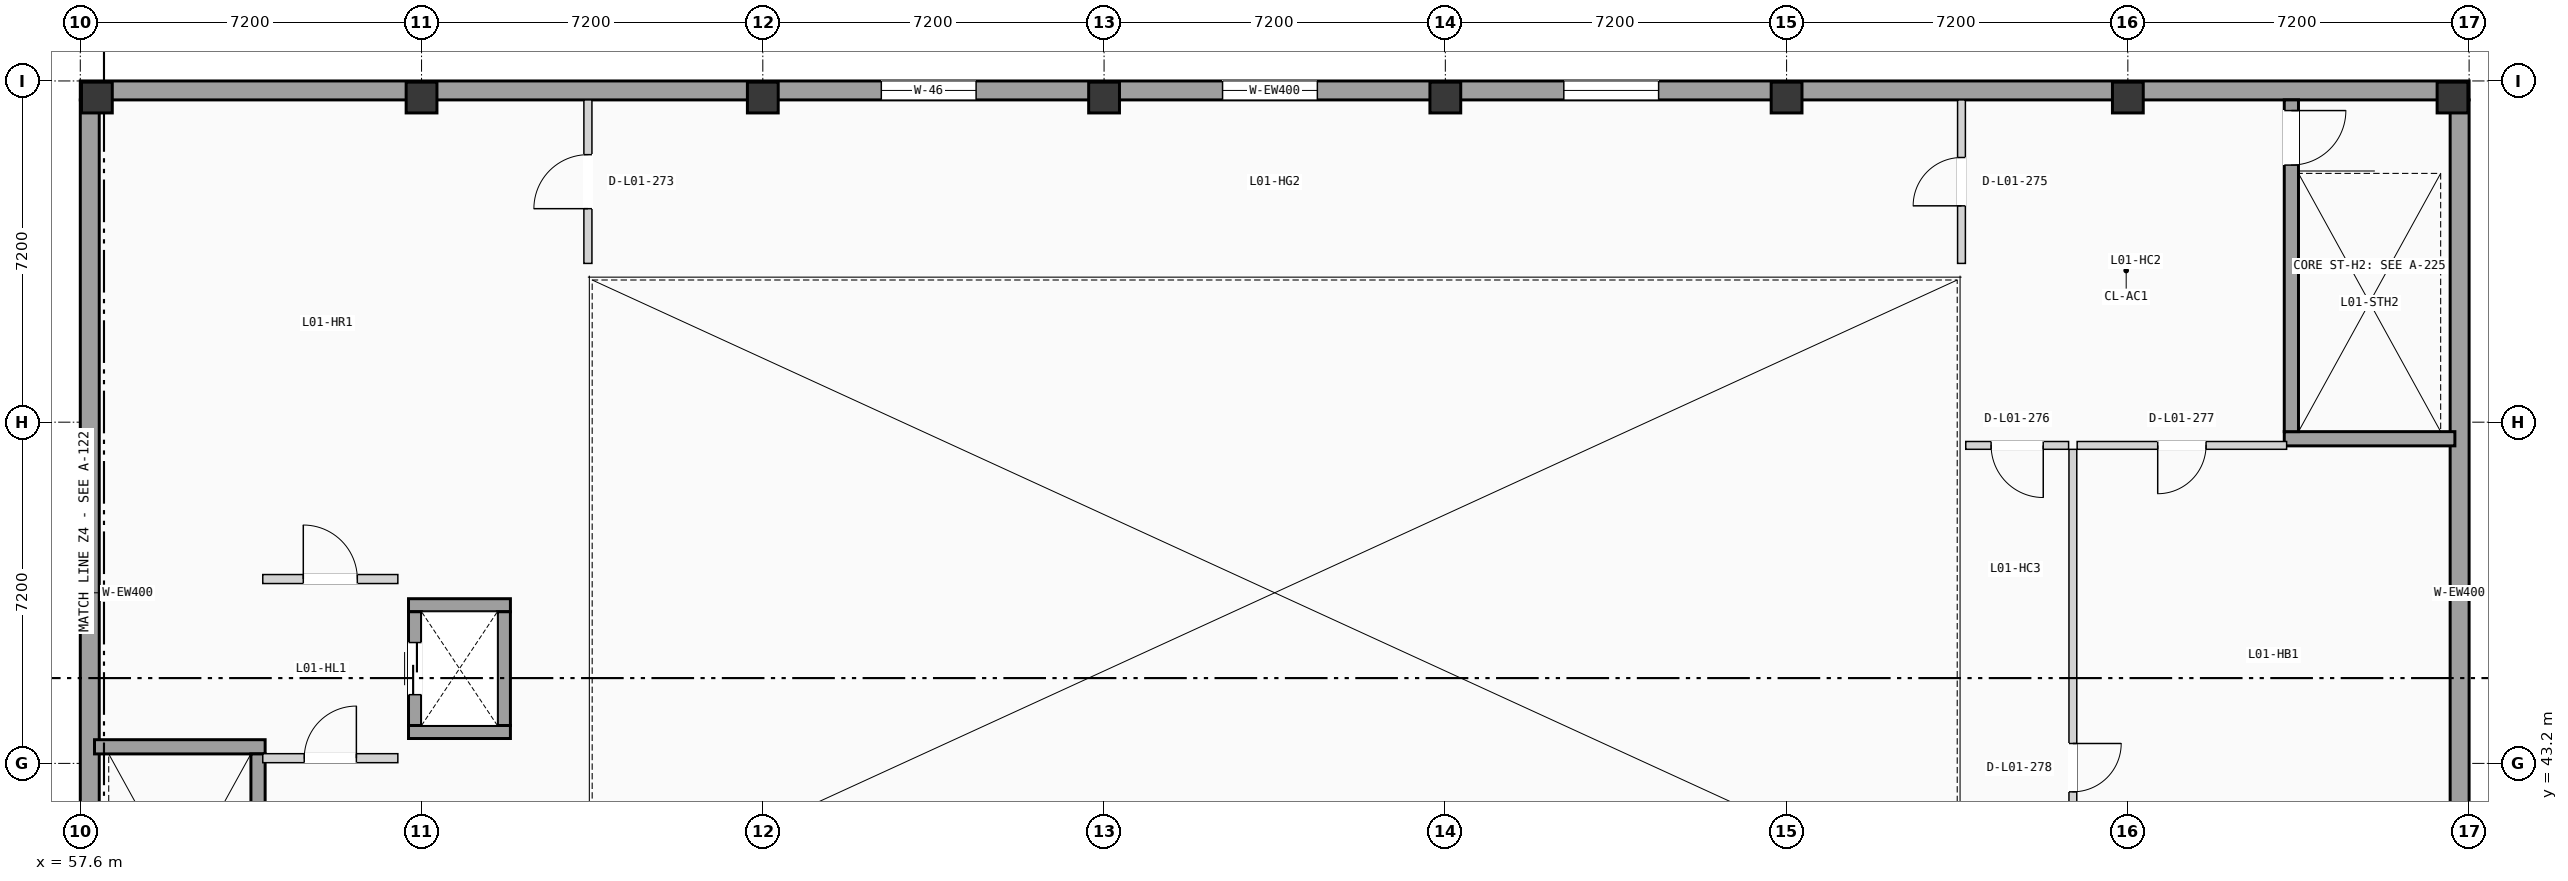
"""IFC4 building model, lengths in metres.
Left out: names, types, materials, properties, quantities, classifications, styles, units other than length and angle.
Written with IfcOpenShell. Run it as: python <this file> out.ifc"""

import sys

from ifc_helpers import new_model, si_unit, direction, frame, frame_2d, origin, origin_2d, place, context, subcontext, project, spatial, rectangle, extrude, element, fill, save


model = new_model("IFC4")
c1 = context("Model", 3, precision=1e-05, world=origin(), true_north=direction((0.0, 1.0)))
c2 = subcontext(c1, "Body", "Model", "MODEL_VIEW")
j1 = project(units=[si_unit("LENGTHUNIT", "METRE"), si_unit("PLANEANGLEUNIT", "RADIAN")], contexts=[c1])
p1 = place(None, origin())
s1 = spatial("IfcSite", under=j1, at=p1, CompositionType="ELEMENT")
p2 = place(p1, origin())
s2 = spatial("IfcBuilding", under=s1, at=p2, CompositionType="ELEMENT")
p3 = place(p2, frame((0.0, 0.0, 4.9)))
s3 = spatial("IfcBuildingStorey", under=s2, at=p3, CompositionType="ELEMENT", Elevation=4.9)
for number, where, z_axis, x_axis in (
    (1, (57.95, 57.25, 0.0), (0.0, 0.0, 1.0), (1.0, 0.0, 0.0)),
    (2, (64.8, 57.25, 0.0), (0.0, 0.0, 1.0), (1.0, 0.0, 0.0)),
    (3, (72.0, 57.25, 0.0), (0.0, 0.0, 1.0), (1.0, 0.0, 0.0)),
    (4, (79.2, 57.25, 0.0), (0.0, 0.0, 1.0), (1.0, 0.0, 0.0)),
    (5, (86.4, 57.25, 0.0), (0.0, 0.0, 1.0), (1.0, 0.0, 0.0)),
    (6, (93.6, 57.25, 0.0), (0.0, 0.0, 1.0), (1.0, 0.0, 0.0)),
    (7, (100.8, 57.25, 0.0), (0.0, 0.0, 1.0), (1.0, 0.0, 0.0)),
    (8, (107.65, 57.25, 0.0), (0.0, 0.0, 1.0), (1.0, 0.0, 0.0)),
):
    element("IfcColumn", number, at=place(p3, frame(where, z_axis=z_axis, x_axis=x_axis)), inside=s3, PredefinedType="COLUMN", context=c2, shape_type="SweptSolid", body=[
        extrude(rectangle(XDim=0.65, YDim=0.65, at=origin_2d()), origin(), (0.0, 0.0, 1.0), 3.675),
    ])
p4 = place(p3, frame((57.6, 57.4, 0.0), z_axis=(0.0, 0.0, 1.0), x_axis=(1.0, 0.0, 0.0)))
e9 = element("IfcWall", 9, at=p4, inside=s3, PredefinedType="SOLIDWALL", context=c2, shape_type="SweptSolid", body=[
    extrude(rectangle(XDim=50.4, YDim=0.4, at=frame_2d((25.2, 0.0))), origin(), (0.0, 0.0, 1.0), 3.675),
])
p5 = place(p4, frame((16.9, 0.0, 0.9)))
e10 = element("IfcOpeningElement", 10, at=p5, cuts=e9, PredefinedType="OPENING", context=c2, shape_type="SweptSolid", body=[
    extrude(rectangle(XDim=2.0, YDim=1.2, at=frame_2d((1.0, 0.6))), frame((0.0, 0.21, 0.0), z_axis=(0.0, -1.0, 0.0), x_axis=(1.0, 0.0, 0.0)), (0.0, 0.0, 1.0), 0.42),
])
p6 = place(p4, frame((24.1, 0.0, 0.9)))
e11 = element("IfcOpeningElement", 11, at=p6, cuts=e9, PredefinedType="OPENING", context=c2, shape_type="SweptSolid", body=[
    extrude(rectangle(XDim=2.0, YDim=1.2, at=frame_2d((1.0, 0.6))), frame((0.0, 0.21, 0.0), z_axis=(0.0, -1.0, 0.0), x_axis=(1.0, 0.0, 0.0)), (0.0, 0.0, 1.0), 0.42),
])
p7 = place(p4, frame((31.3, 0.0, 0.9)))
e12 = element("IfcOpeningElement", 12, at=p7, cuts=e9, PredefinedType="OPENING", context=c2, shape_type="SweptSolid", body=[
    extrude(rectangle(XDim=2.0, YDim=1.2, at=frame_2d((1.0, 0.6))), frame((0.0, 0.21, 0.0), z_axis=(0.0, -1.0, 0.0), x_axis=(1.0, 0.0, 0.0)), (0.0, 0.0, 1.0), 0.42),
])
for number, where, z_axis, x_axis in (
    (13, (57.8, 36.4, 0.0), (0.0, 0.0, 1.0), (0.0, 1.0, 0.0)),
    (14, (107.8, 36.4, 0.0), (0.0, 0.0, 1.0), (0.0, 1.0, 0.0)),
):
    element("IfcWall", number, at=place(p3, frame(where, z_axis=z_axis, x_axis=x_axis)), inside=s3, PredefinedType="SOLIDWALL", context=c2, shape_type="SweptSolid", body=[
        extrude(rectangle(XDim=20.8, YDim=0.4, at=frame_2d((10.4, 0.0))), origin(), (0.0, 0.0, 1.0), 3.675),
    ])
p8 = place(p3, frame((57.9, 43.55, 0.0), z_axis=(0.0, 0.0, 1.0), x_axis=(1.0, 0.0, 0.0)))
e15 = element("IfcWall", 15, at=p8, inside=s3, PredefinedType="SHEAR", context=c2, shape_type="SweptSolid", body=[
    extrude(rectangle(XDim=3.6, YDim=0.3, at=frame_2d((1.8, 0.0))), origin(), (0.0, 0.0, 1.0), 3.405),
])
p9 = place(p3, frame((61.35, 36.4, 0.0), z_axis=(0.0, 0.0, 1.0), x_axis=(0.0, 1.0, 0.0)))
e16 = element("IfcWall", 16, at=p9, inside=s3, PredefinedType="SHEAR", context=c2, shape_type="SweptSolid", body=[
    extrude(rectangle(XDim=7.0, YDim=0.3, at=frame_2d((3.5, 0.0))), origin(), (0.0, 0.0, 1.0), 3.405),
])
p10 = place(p9, frame((0.225, 0.0, 0.0)))
e17 = element("IfcOpeningElement", 17, at=p10, cuts=e16, PredefinedType="OPENING", context=c2, shape_type="SweptSolid", body=[
    extrude(rectangle(XDim=1.15, YDim=2.12, at=frame_2d((0.575, 1.06))), frame((0.0, 0.16, 0.0), z_axis=(0.0, -1.0, 0.0), x_axis=(1.0, 0.0, 0.0)), (0.0, 0.0, 1.0), 0.32),
])
p11 = place(p3, frame((104.1, 50.05, 0.0), z_axis=(0.0, 0.0, 1.0), x_axis=(1.0, 0.0, 0.0)))
e18 = element("IfcWall", 18, at=p11, inside=s3, PredefinedType="SHEAR", context=c2, shape_type="SweptSolid", body=[
    extrude(rectangle(XDim=3.6, YDim=0.3, at=frame_2d((1.8, 0.0))), origin(), (0.0, 0.0, 1.0), 3.405),
])
p12 = place(p3, frame((104.25, 50.2, 0.0), z_axis=(0.0, 0.0, 1.0), x_axis=(0.0, 1.0, 0.0)))
e19 = element("IfcWall", 19, at=p12, inside=s3, PredefinedType="SHEAR", context=c2, shape_type="SweptSolid", body=[
    extrude(rectangle(XDim=7.0, YDim=0.3, at=frame_2d((3.5, 0.0))), origin(), (0.0, 0.0, 1.0), 3.405),
])
p13 = place(p12, frame((5.625, 0.0, 0.0)))
e20 = element("IfcOpeningElement", 20, at=p13, cuts=e19, PredefinedType="OPENING", context=c2, shape_type="SweptSolid", body=[
    extrude(rectangle(XDim=1.15, YDim=2.12, at=frame_2d((0.575, 1.06))), frame((0.0, 0.16, 0.0), z_axis=(0.0, -1.0, 0.0), x_axis=(1.0, 0.0, 0.0)), (0.0, 0.0, 1.0), 0.32),
])
for number, where, z_axis, x_axis in (
    (21, (64.525, 43.863, 0.0), (0.0, 0.0, 1.0), (1.0, 0.0, 0.0)),
    (22, (64.525, 46.538, 0.0), (0.0, 0.0, 1.0), (1.0, 0.0, 0.0)),
):
    element("IfcWall", number, at=place(p3, frame(where, z_axis=z_axis, x_axis=x_axis)), inside=s3, PredefinedType="SHEAR", context=c2, shape_type="SweptSolid", body=[
        extrude(rectangle(XDim=2.15, YDim=0.275, at=frame_2d((1.075, 0.0))), origin(), (0.0, 0.0, 1.0), 3.405),
    ])
p14 = place(p3, frame((64.663, 44.0, 0.0), z_axis=(0.0, 0.0, 1.0), x_axis=(0.0, 1.0, 0.0)))
e23 = element("IfcWall", 23, at=p14, inside=s3, PredefinedType="SHEAR", context=c2, shape_type="SweptSolid", body=[
    extrude(rectangle(XDim=2.4, YDim=0.275, at=frame_2d((1.2, 0.0))), origin(), (0.0, 0.0, 1.0), 3.405),
])
p15 = place(p14, frame((0.65, 0.0, 0.0)))
e24 = element("IfcOpeningElement", 24, at=p15, cuts=e23, PredefinedType="OPENING", context=c2, shape_type="SweptSolid", body=[
    extrude(rectangle(XDim=1.1, YDim=2.15, at=frame_2d((0.55, 1.075))), frame((0.0, 0.147, 0.0), z_axis=(0.0, -1.0, 0.0), x_axis=(1.0, 0.0, 0.0)), (0.0, 0.0, 1.0), 0.295),
])
p16 = place(p3, frame((66.538, 44.0, 0.0), z_axis=(0.0, 0.0, 1.0), x_axis=(0.0, 1.0, 0.0)))
e25 = element("IfcWall", 25, at=p16, inside=s3, PredefinedType="SHEAR", context=c2, shape_type="SweptSolid", body=[
    extrude(rectangle(XDim=2.4, YDim=0.275, at=frame_2d((1.2, 0.0))), origin(), (0.0, 0.0, 1.0), 3.405),
])
p17 = place(p3, frame((61.45, 43.31, 0.0), z_axis=(0.0, 0.0, 1.0), x_axis=(1.0, 0.0, 0.0)))
e26 = element("IfcWall", 26, at=p17, inside=s3, PredefinedType="PARTITIONING", context=c2, shape_type="SweptSolid", body=[
    extrude(rectangle(XDim=2.85, YDim=0.19, at=frame_2d((1.425, 0.0))), origin(), (0.0, 0.0, 1.0), 2.84),
])
p18 = place(p17, frame((0.875, 0.0, 0.0)))
e27 = element("IfcOpeningElement", 27, at=p18, cuts=e26, PredefinedType="OPENING", context=c2, shape_type="SweptSolid", body=[
    extrude(rectangle(XDim=1.1, YDim=2.12, at=frame_2d((0.55, 1.06))), frame((0.0, 0.105, 0.0), z_axis=(0.0, -1.0, 0.0), x_axis=(1.0, 0.0, 0.0)), (0.0, 0.0, 1.0), 0.21),
])
p19 = place(p3, frame((61.45, 47.09, 0.0), z_axis=(0.0, 0.0, 1.0), x_axis=(1.0, 0.0, 0.0)))
e28 = element("IfcWall", 28, at=p19, inside=s3, PredefinedType="PARTITIONING", context=c2, shape_type="SweptSolid", body=[
    extrude(rectangle(XDim=2.85, YDim=0.19, at=frame_2d((1.425, 0.0))), origin(), (0.0, 0.0, 1.0), 2.84),
])
p20 = place(p19, frame((0.855, 0.0, 0.0)))
e29 = element("IfcOpeningElement", 29, at=p20, cuts=e28, PredefinedType="OPENING", context=c2, shape_type="SweptSolid", body=[
    extrude(rectangle(XDim=1.14, YDim=2.18, at=frame_2d((0.57, 1.09))), frame((0.0, 0.105, 0.0), z_axis=(0.0, -1.0, 0.0), x_axis=(1.0, 0.0, 0.0)), (0.0, 0.0, 1.0), 0.21),
])
p21 = place(p3, frame((68.31, 53.75, 0.0), z_axis=(0.0, 0.0, 1.0), x_axis=(0.0, 1.0, 0.0)))
e30 = element("IfcWall", 30, at=p21, inside=s3, PredefinedType="PARTITIONING", context=c2, shape_type="SweptSolid", body=[
    extrude(rectangle(XDim=3.45, YDim=0.17, at=frame_2d((1.725, 0.0))), origin(), (0.0, 0.0, 1.0), 2.84),
])
p22 = place(p21, frame((1.155, 0.0, 0.0)))
e31 = element("IfcOpeningElement", 31, at=p22, cuts=e30, PredefinedType="OPENING", context=c2, shape_type="SweptSolid", body=[
    extrude(rectangle(XDim=1.14, YDim=2.18, at=frame_2d((0.57, 1.09))), frame((0.0, 0.095, 0.0), z_axis=(0.0, -1.0, 0.0), x_axis=(1.0, 0.0, 0.0)), (0.0, 0.0, 1.0), 0.19),
])
p23 = place(p3, frame((97.29, 53.75, 0.0), z_axis=(0.0, 0.0, 1.0), x_axis=(0.0, 1.0, 0.0)))
e32 = element("IfcWall", 32, at=p23, inside=s3, PredefinedType="PARTITIONING", context=c2, shape_type="SweptSolid", body=[
    extrude(rectangle(XDim=3.45, YDim=0.165, at=frame_2d((1.725, 0.0))), origin(), (0.0, 0.0, 1.0), 2.84),
])
p24 = place(p23, frame((1.215, 0.0, 0.0)))
e33 = element("IfcOpeningElement", 33, at=p24, cuts=e32, PredefinedType="OPENING", context=c2, shape_type="SweptSolid", body=[
    extrude(rectangle(XDim=1.02, YDim=2.16, at=frame_2d((0.51, 1.08))), frame((0.0, 0.093, 0.0), z_axis=(0.0, -1.0, 0.0), x_axis=(1.0, 0.0, 0.0)), (0.0, 0.0, 1.0), 0.185),
])
p25 = place(p3, frame((97.38, 49.91, 0.0), z_axis=(0.0, 0.0, 1.0), x_axis=(1.0, 0.0, 0.0)))
e34 = element("IfcWall", 34, at=p25, inside=s3, PredefinedType="PARTITIONING", context=c2, shape_type="SweptSolid", body=[
    extrude(rectangle(XDim=2.17, YDim=0.165, at=frame_2d((1.085, 0.0))), origin(), (0.0, 0.0, 1.0), 2.84),
])
p26 = place(p25, frame((0.535, 0.0, 0.0)))
e35 = element("IfcOpeningElement", 35, at=p26, cuts=e34, PredefinedType="OPENING", context=c2, shape_type="SweptSolid", body=[
    extrude(rectangle(XDim=1.1, YDim=2.12, at=frame_2d((0.55, 1.06))), frame((0.0, 0.093, 0.0), z_axis=(0.0, -1.0, 0.0), x_axis=(1.0, 0.0, 0.0)), (0.0, 0.0, 1.0), 0.185),
])
p27 = place(p3, frame((99.73, 49.91, 0.0), z_axis=(0.0, 0.0, 1.0), x_axis=(1.0, 0.0, 0.0)))
e36 = element("IfcWall", 36, at=p27, inside=s3, PredefinedType="PARTITIONING", context=c2, shape_type="SweptSolid", body=[
    extrude(rectangle(XDim=4.42, YDim=0.165, at=frame_2d((2.21, 0.0))), origin(), (0.0, 0.0, 1.0), 2.84),
])
p28 = place(p27, frame((1.7, 0.0, 0.0)))
e37 = element("IfcOpeningElement", 37, at=p28, cuts=e36, PredefinedType="OPENING", context=c2, shape_type="SweptSolid", body=[
    extrude(rectangle(XDim=1.02, YDim=2.16, at=frame_2d((0.51, 1.08))), frame((0.0, 0.093, 0.0), z_axis=(0.0, -1.0, 0.0), x_axis=(1.0, 0.0, 0.0)), (0.0, 0.0, 1.0), 0.185),
])
p29 = place(p3, frame((99.64, 36.4, 0.0), z_axis=(0.0, 0.0, 1.0), x_axis=(0.0, 1.0, 0.0)))
e38 = element("IfcWall", 38, at=p29, inside=s3, PredefinedType="PARTITIONING", context=c2, shape_type="SweptSolid", body=[
    extrude(rectangle(XDim=13.427, YDim=0.165, at=frame_2d((6.713, 0.0))), origin(), (0.0, 0.0, 1.0), 2.84),
])
p30 = place(p29, frame((6.2, 0.0, 0.0)))
e39 = element("IfcOpeningElement", 39, at=p30, cuts=e38, PredefinedType="OPENING", context=c2, shape_type="SweptSolid", body=[
    extrude(rectangle(XDim=1.02, YDim=2.16, at=frame_2d((0.51, 1.08))), frame((0.0, 0.093, 0.0), z_axis=(0.0, -1.0, 0.0), x_axis=(1.0, 0.0, 0.0)), (0.0, 0.0, 1.0), 0.185),
])
p31 = place(p5, origin())
e40 = element("IfcWindow", 40, at=p31, inside=s3, PartitioningType="DOUBLE_PANEL_VERTICAL", PredefinedType="WINDOW", context=c2, shape_type="SweptSolid", body=[
    extrude(rectangle(XDim=2.0, YDim=1.2, at=frame_2d((1.0, 0.6))), frame((0.0, 0.03, 0.0), z_axis=(0.0, -1.0, 0.0), x_axis=(1.0, 0.0, 0.0)), (0.0, 0.0, 1.0), 0.06),
])
fill(e10, e40)
p32 = place(p6, origin())
e41 = element("IfcWindow", 41, at=p32, inside=s3, PartitioningType="DOUBLE_PANEL_VERTICAL", PredefinedType="WINDOW", context=c2, shape_type="SweptSolid", body=[
    extrude(rectangle(XDim=2.0, YDim=1.2, at=frame_2d((1.0, 0.6))), frame((0.0, 0.03, 0.0), z_axis=(0.0, -1.0, 0.0), x_axis=(1.0, 0.0, 0.0)), (0.0, 0.0, 1.0), 0.06),
])
fill(e11, e41)
p33 = place(p7, origin())
e42 = element("IfcWindow", 42, at=p33, inside=s3, PartitioningType="DOUBLE_PANEL_VERTICAL", PredefinedType="WINDOW", context=c2, shape_type="SweptSolid", body=[
    extrude(rectangle(XDim=2.0, YDim=1.2, at=frame_2d((1.0, 0.6))), frame((0.0, 0.03, 0.0), z_axis=(0.0, -1.0, 0.0), x_axis=(1.0, 0.0, 0.0)), (0.0, 0.0, 1.0), 0.06),
])
fill(e12, e42)
p34 = place(p13, frame((1.15, 0.0, 0.0), z_axis=(0.0, 0.0, 1.0), x_axis=(-1.0, 0.0, 0.0)))
e43 = element("IfcDoor", 43, at=p34, inside=s3, OperationType="SINGLE_SWING_RIGHT", PredefinedType="DOOR", context=c2, shape_type="SweptSolid", body=[
    extrude(rectangle(XDim=1.15, YDim=2.12, at=frame_2d((0.575, 1.06))), frame((0.0, 0.025, 0.0), z_axis=(0.0, -1.0, 0.0), x_axis=(1.0, 0.0, 0.0)), (0.0, 0.0, 1.0), 0.05),
])
fill(e20, e43)
p35 = place(p15, origin())
e44 = element("IfcDoor", 44, at=p35, inside=s3, OperationType="SLIDING_TO_LEFT", PredefinedType="DOOR", context=c2, shape_type="SweptSolid", body=[
    extrude(rectangle(XDim=1.1, YDim=2.15, at=frame_2d((0.55, 1.075))), frame((0.0, 0.025, 0.0), z_axis=(0.0, -1.0, 0.0), x_axis=(1.0, 0.0, 0.0)), (0.0, 0.0, 1.0), 0.05),
])
fill(e24, e44)
p36 = place(p18, origin())
e45 = element("IfcDoor", 45, at=p36, inside=s3, OperationType="SINGLE_SWING_RIGHT", PredefinedType="DOOR", context=c2, shape_type="SweptSolid", body=[
    extrude(rectangle(XDim=1.1, YDim=2.12, at=frame_2d((0.55, 1.06))), frame((0.0, 0.025, 0.0), z_axis=(0.0, -1.0, 0.0), x_axis=(1.0, 0.0, 0.0)), (0.0, 0.0, 1.0), 0.05),
])
fill(e27, e45)
p37 = place(p20, origin())
e46 = element("IfcDoor", 46, at=p37, inside=s3, OperationType="SINGLE_SWING_LEFT", PredefinedType="DOOR", context=c2, shape_type="SweptSolid", body=[
    extrude(rectangle(XDim=1.14, YDim=2.18, at=frame_2d((0.57, 1.09))), frame((0.0, 0.025, 0.0), z_axis=(0.0, -1.0, 0.0), x_axis=(1.0, 0.0, 0.0)), (0.0, 0.0, 1.0), 0.05),
])
fill(e29, e46)
p38 = place(p22, origin())
e47 = element("IfcDoor", 47, at=p38, inside=s3, OperationType="SINGLE_SWING_LEFT", PredefinedType="DOOR", context=c2, shape_type="SweptSolid", body=[
    extrude(rectangle(XDim=1.14, YDim=2.18, at=frame_2d((0.57, 1.09))), frame((0.0, 0.025, 0.0), z_axis=(0.0, -1.0, 0.0), x_axis=(1.0, 0.0, 0.0)), (0.0, 0.0, 1.0), 0.05),
])
fill(e31, e47)
p39 = place(p24, origin())
e48 = element("IfcDoor", 48, at=p39, inside=s3, OperationType="SINGLE_SWING_LEFT", PredefinedType="DOOR", context=c2, shape_type="SweptSolid", body=[
    extrude(rectangle(XDim=1.02, YDim=2.16, at=frame_2d((0.51, 1.08))), frame((0.0, 0.025, 0.0), z_axis=(0.0, -1.0, 0.0), x_axis=(1.0, 0.0, 0.0)), (0.0, 0.0, 1.0), 0.05),
])
fill(e33, e48)
p40 = place(p26, frame((1.1, 0.0, 0.0), z_axis=(0.0, 0.0, 1.0), x_axis=(-1.0, 0.0, 0.0)))
e49 = element("IfcDoor", 49, at=p40, inside=s3, OperationType="SINGLE_SWING_RIGHT", PredefinedType="DOOR", context=c2, shape_type="SweptSolid", body=[
    extrude(rectangle(XDim=1.1, YDim=2.12, at=frame_2d((0.55, 1.06))), frame((0.0, 0.025, 0.0), z_axis=(0.0, -1.0, 0.0), x_axis=(1.0, 0.0, 0.0)), (0.0, 0.0, 1.0), 0.05),
])
fill(e35, e49)
p41 = place(p28, frame((1.02, 0.0, 0.0), z_axis=(0.0, 0.0, 1.0), x_axis=(-1.0, 0.0, 0.0)))
e50 = element("IfcDoor", 50, at=p41, inside=s3, OperationType="SINGLE_SWING_LEFT", PredefinedType="DOOR", context=c2, shape_type="SweptSolid", body=[
    extrude(rectangle(XDim=1.02, YDim=2.16, at=frame_2d((0.51, 1.08))), frame((0.0, 0.025, 0.0), z_axis=(0.0, -1.0, 0.0), x_axis=(1.0, 0.0, 0.0)), (0.0, 0.0, 1.0), 0.05),
])
fill(e37, e50)
p42 = place(p30, frame((1.02, 0.0, 0.0), z_axis=(0.0, 0.0, 1.0), x_axis=(-1.0, 0.0, 0.0)))
e51 = element("IfcDoor", 51, at=p42, inside=s3, OperationType="SINGLE_SWING_RIGHT", PredefinedType="DOOR", context=c2, shape_type="SweptSolid", body=[
    extrude(rectangle(XDim=1.02, YDim=2.16, at=frame_2d((0.51, 1.08))), frame((0.0, 0.025, 0.0), z_axis=(0.0, -1.0, 0.0), x_axis=(1.0, 0.0, 0.0)), (0.0, 0.0, 1.0), 0.05),
])
fill(e39, e51)
save(model, sys.argv[1])
